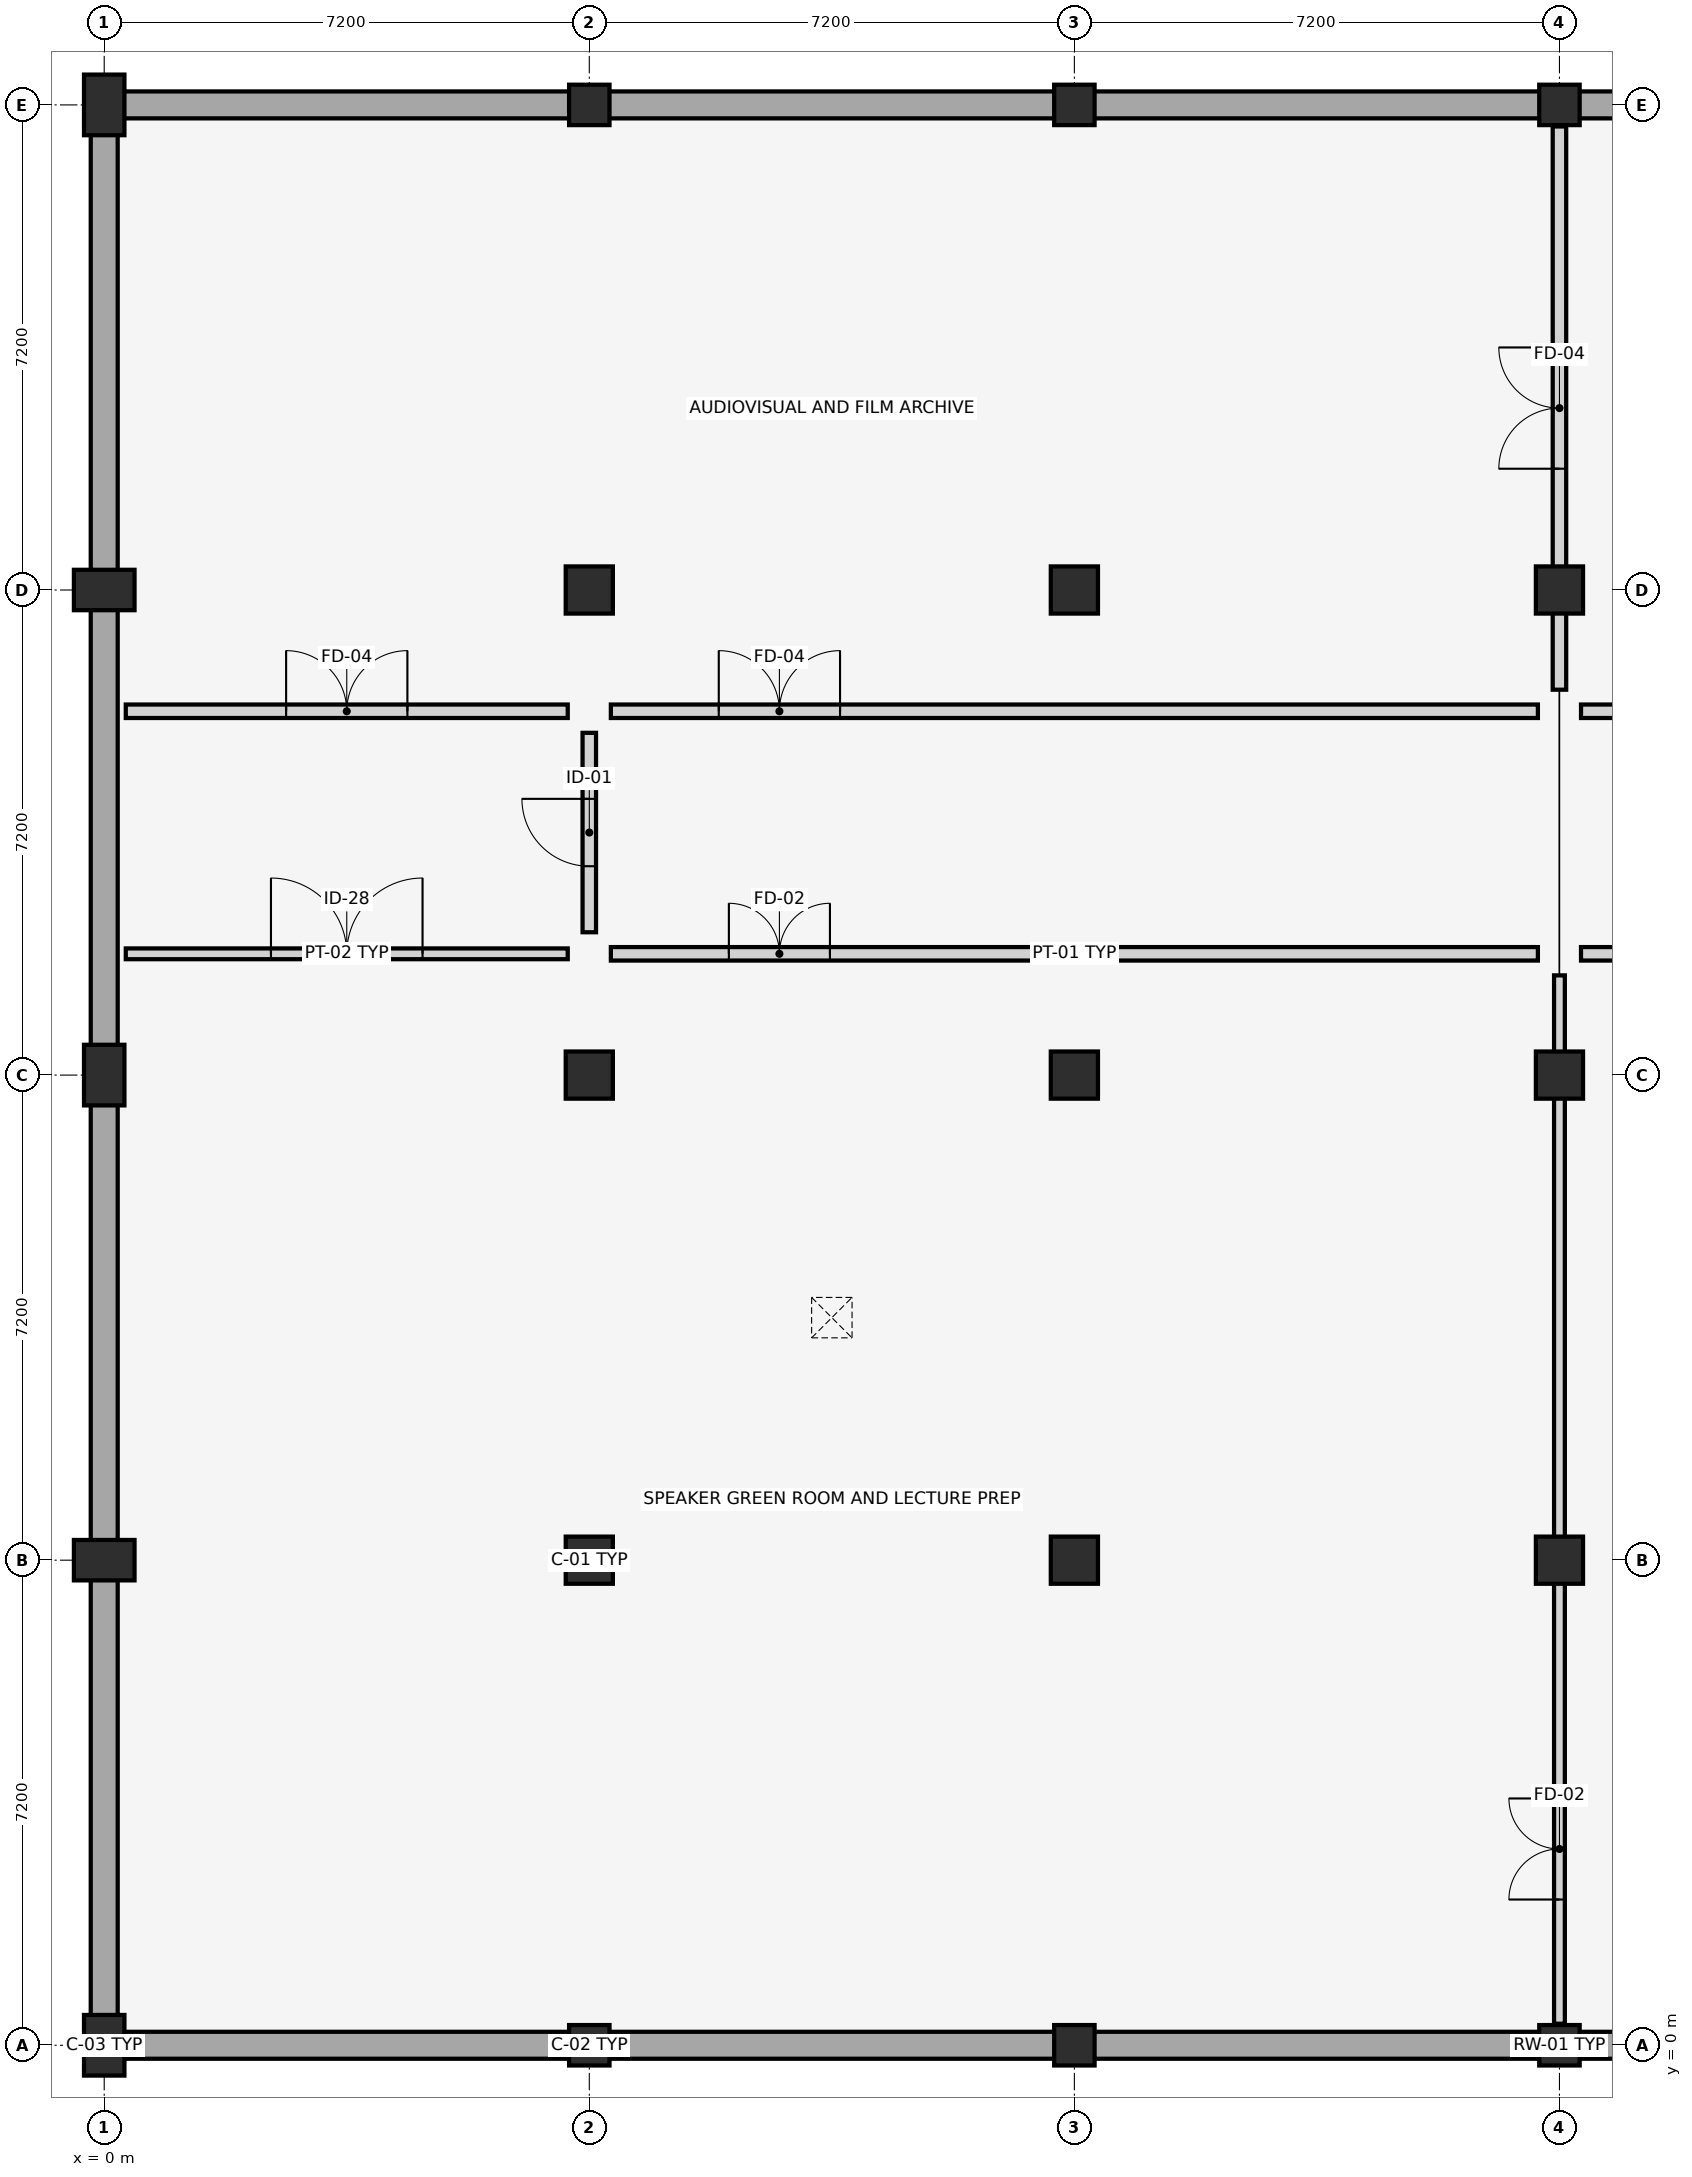
"""IFC4 building model, lengths in metres.
Left out: names, types, materials, properties, quantities, classifications, styles, units other than length and angle.
Written with IfcOpenShell. Run it as: python <this file> out.ifc"""

import sys

from ifc_helpers import new_model, si_unit, direction, frame, frame_2d, origin, origin_2d, place, context, subcontext, project, spatial, rectangle, extrude, element, fill, save


model = new_model("IFC4")
c1 = context("Model", 3, precision=1e-05, world=origin(), true_north=direction((0.0, 1.0)))
c2 = subcontext(c1, "Body", "Model", "MODEL_VIEW")
j1 = project(units=[si_unit("LENGTHUNIT", "METRE"), si_unit("PLANEANGLEUNIT", "RADIAN")], contexts=[c1])
p1 = place(None, origin())
s1 = spatial("IfcSite", under=j1, at=p1, CompositionType="ELEMENT")
p2 = place(p1, origin())
s2 = spatial("IfcBuilding", under=s1, at=p2, CompositionType="ELEMENT")
p3 = place(p2, frame((0.0, 0.0, -4.5)))
s3 = spatial("IfcBuildingStorey", under=s2, at=p3, CompositionType="ELEMENT", Elevation=-4.5)
for number, where, z_axis, x_axis in (
    (1, (-0.2, 0.0, 0.0), (0.0, 0.0, 1.0), (1.0, 0.0, 0.0)),
    (2, (43.4, 28.8, 0.0), (0.0, 0.0, 1.0), (-1.0, 0.0, 0.0)),
):
    element("IfcWall", number, at=place(p3, frame(where, z_axis=z_axis, x_axis=x_axis)), inside=s3, PredefinedType="USERDEFINED", context=c2, shape_type="SweptSolid", body=[
        extrude(rectangle(XDim=43.6, YDim=0.4, at=frame_2d((21.8, 0.0))), origin(), (0.0, 0.0, 1.0), 3.67),
    ])
p4 = place(p3, frame((0.0, 28.6, 0.0), z_axis=(0.0, 0.0, 1.0), x_axis=(0.0, -1.0, 0.0)))
e3 = element("IfcWall", 3, at=p4, inside=s3, PredefinedType="USERDEFINED", context=c2, shape_type="SweptSolid", body=[
    extrude(rectangle(XDim=28.4, YDim=0.4, at=frame_2d((14.2, 0.0))), origin(), (0.0, 0.0, 1.0), 3.67),
])
for number, where, z_axis, x_axis in (
    (4, (0.0, 0.0, -0.45), (0.0, 0.0, 1.0), (1.0, 0.0, 0.0)),
    (5, (0.0, 7.2, -0.45), (0.0, 0.0, 1.0), (0.0, 1.0, 0.0)),
    (6, (0.0, 14.4, -0.45), (0.0, 0.0, 1.0), (1.0, 0.0, 0.0)),
    (7, (0.0, 21.6, -0.45), (0.0, 0.0, 1.0), (0.0, 1.0, 0.0)),
    (8, (0.0, 28.8, -0.45), (0.0, 0.0, 1.0), (1.0, 0.0, 0.0)),
):
    element("IfcColumn", number, at=place(p3, frame(where, z_axis=z_axis, x_axis=x_axis)), inside=s3, PredefinedType="PILASTER", context=c2, shape_type="SweptSolid", body=[
        extrude(rectangle(XDim=0.6, YDim=0.9, at=origin_2d()), origin(), (0.0, 0.0, 1.0), 4.95),
    ])
p5 = place(p3, frame((7.2, 0.0, -0.45), z_axis=(0.0, 0.0, 1.0), x_axis=(0.0, 1.0, 0.0)))
e9 = element("IfcColumn", 9, at=p5, inside=s3, PredefinedType="COLUMN", context=c2, shape_type="SweptSolid", body=[
    extrude(rectangle(XDim=0.6, YDim=0.6, at=origin_2d()), origin(), (0.0, 0.0, 1.0), 4.95),
])
for number, where, z_axis, x_axis in (
    (10, (7.2, 7.2, -0.45), (0.0, 0.0, 1.0), (1.0, 0.0, 0.0)),
    (11, (7.2, 14.4, -0.45), (0.0, 0.0, 1.0), (0.0, 1.0, 0.0)),
    (12, (7.2, 21.6, -0.45), (0.0, 0.0, 1.0), (1.0, 0.0, 0.0)),
):
    element("IfcColumn", number, at=place(p3, frame(where, z_axis=z_axis, x_axis=x_axis)), inside=s3, PredefinedType="COLUMN", context=c2, shape_type="SweptSolid", body=[
        extrude(rectangle(XDim=0.7, YDim=0.7, at=origin_2d()), origin(), (0.0, 0.0, 1.0), 4.95),
    ])
for number, where, z_axis, x_axis in (
    (13, (7.2, 28.8, -0.45), (0.0, 0.0, 1.0), (0.0, 1.0, 0.0)),
    (14, (14.4, 0.0, -0.45), (0.0, 0.0, 1.0), (1.0, 0.0, 0.0)),
):
    element("IfcColumn", number, at=place(p3, frame(where, z_axis=z_axis, x_axis=x_axis)), inside=s3, PredefinedType="COLUMN", context=c2, shape_type="SweptSolid", body=[
        extrude(rectangle(XDim=0.6, YDim=0.6, at=origin_2d()), origin(), (0.0, 0.0, 1.0), 4.95),
    ])
for number, where, z_axis, x_axis in (
    (15, (14.4, 7.2, -0.45), (0.0, 0.0, 1.0), (0.0, 1.0, 0.0)),
    (16, (14.4, 14.4, -0.45), (0.0, 0.0, 1.0), (1.0, 0.0, 0.0)),
    (17, (14.4, 21.6, -0.45), (0.0, 0.0, 1.0), (0.0, 1.0, 0.0)),
):
    element("IfcColumn", number, at=place(p3, frame(where, z_axis=z_axis, x_axis=x_axis)), inside=s3, PredefinedType="COLUMN", context=c2, shape_type="SweptSolid", body=[
        extrude(rectangle(XDim=0.7, YDim=0.7, at=origin_2d()), origin(), (0.0, 0.0, 1.0), 4.95),
    ])
for number, where, z_axis, x_axis in (
    (18, (14.4, 28.8, -0.45), (0.0, 0.0, 1.0), (1.0, 0.0, 0.0)),
    (19, (21.6, 0.0, -0.45), (0.0, 0.0, 1.0), (0.0, 1.0, 0.0)),
):
    element("IfcColumn", number, at=place(p3, frame(where, z_axis=z_axis, x_axis=x_axis)), inside=s3, PredefinedType="COLUMN", context=c2, shape_type="SweptSolid", body=[
        extrude(rectangle(XDim=0.6, YDim=0.6, at=origin_2d()), origin(), (0.0, 0.0, 1.0), 4.95),
    ])
for number, where, z_axis, x_axis in (
    (20, (21.6, 7.2, -0.45), (0.0, 0.0, 1.0), (1.0, 0.0, 0.0)),
    (21, (21.6, 14.4, -0.45), (0.0, 0.0, 1.0), (0.0, 1.0, 0.0)),
    (22, (21.6, 21.6, -0.45), (0.0, 0.0, 1.0), (1.0, 0.0, 0.0)),
):
    element("IfcColumn", number, at=place(p3, frame(where, z_axis=z_axis, x_axis=x_axis)), inside=s3, PredefinedType="COLUMN", context=c2, shape_type="SweptSolid", body=[
        extrude(rectangle(XDim=0.7, YDim=0.7, at=origin_2d()), origin(), (0.0, 0.0, 1.0), 4.95),
    ])
p6 = place(p3, frame((21.6, 28.8, -0.45), z_axis=(0.0, 0.0, 1.0), x_axis=(0.0, 1.0, 0.0)))
e23 = element("IfcColumn", 23, at=p6, inside=s3, PredefinedType="COLUMN", context=c2, shape_type="SweptSolid", body=[
    extrude(rectangle(XDim=0.6, YDim=0.6, at=origin_2d()), origin(), (0.0, 0.0, 1.0), 4.95),
])
p7 = place(p3, frame((7.52, 16.2, 0.0), z_axis=(0.0, 0.0, 1.0), x_axis=(1.0, 0.0, 0.0)))
e24 = element("IfcWall", 24, at=p7, inside=s3, PredefinedType="PARTITIONING", context=c2, shape_type="SweptSolid", body=[
    extrude(rectangle(XDim=13.76, YDim=0.2, at=frame_2d((6.88, 0.0))), origin(), (0.0, 0.0, 1.0), 3.45),
])
p8 = place(p7, frame((1.752, 0.0, 0.0)))
e25 = element("IfcOpeningElement", 25, at=p8, cuts=e24, PredefinedType="OPENING", context=c2, shape_type="SweptSolid", body=[
    extrude(rectangle(XDim=1.5, YDim=2.25, at=frame_2d((0.75, 1.125))), frame((0.0, 0.11, 0.0), z_axis=(0.0, -1.0, 0.0), x_axis=(1.0, 0.0, 0.0)), (0.0, 0.0, 1.0), 0.22),
])
p9 = place(p3, frame((7.52, 19.8, 0.0), z_axis=(0.0, 0.0, 1.0), x_axis=(1.0, 0.0, 0.0)))
e26 = element("IfcWall", 26, at=p9, inside=s3, PredefinedType="PARTITIONING", context=c2, shape_type="SweptSolid", body=[
    extrude(rectangle(XDim=13.76, YDim=0.2, at=frame_2d((6.88, 0.0))), origin(), (0.0, 0.0, 1.0), 3.45),
])
p10 = place(p9, frame((1.602, 0.0, 0.0)))
e27 = element("IfcOpeningElement", 27, at=p10, cuts=e26, PredefinedType="OPENING", context=c2, shape_type="SweptSolid", body=[
    extrude(rectangle(XDim=1.8, YDim=2.4, at=frame_2d((0.9, 1.2))), frame((0.0, 0.11, 0.0), z_axis=(0.0, -1.0, 0.0), x_axis=(1.0, 0.0, 0.0)), (0.0, 0.0, 1.0), 0.22),
])
p11 = place(p3, frame((7.2, 16.52, 0.0), z_axis=(0.0, 0.0, 1.0), x_axis=(0.0, 1.0, 0.0)))
e28 = element("IfcWall", 28, at=p11, inside=s3, PredefinedType="PARTITIONING", context=c2, shape_type="SweptSolid", body=[
    extrude(rectangle(XDim=2.96, YDim=0.2, at=frame_2d((1.48, 0.0))), origin(), (0.0, 0.0, 1.0), 3.45),
])
p12 = place(p11, frame((0.98, 0.0, 0.0)))
e29 = element("IfcOpeningElement", 29, at=p12, cuts=e28, PredefinedType="OPENING", context=c2, shape_type="SweptSolid", body=[
    extrude(rectangle(XDim=1.0, YDim=2.15, at=frame_2d((0.5, 1.075))), frame((0.0, 0.11, 0.0), z_axis=(0.0, -1.0, 0.0), x_axis=(1.0, 0.0, 0.0)), (0.0, 0.0, 1.0), 0.22),
])
p13 = place(p3, frame((21.92, 16.2, 0.0), z_axis=(0.0, 0.0, 1.0), x_axis=(1.0, 0.0, 0.0)))
e30 = element("IfcWall", 30, at=p13, inside=s3, PredefinedType="PARTITIONING", context=c2, shape_type="SweptSolid", body=[
    extrude(rectangle(XDim=13.76, YDim=0.2, at=frame_2d((6.88, 0.0))), origin(), (0.0, 0.0, 1.0), 3.45),
])
p14 = place(p13, frame((1.752, 0.0, 0.0)))
e31 = element("IfcOpeningElement", 31, at=p14, cuts=e30, PredefinedType="OPENING", context=c2, shape_type="SweptSolid", body=[
    extrude(rectangle(XDim=1.5, YDim=2.25, at=frame_2d((0.75, 1.125))), frame((0.0, 0.11, 0.0), z_axis=(0.0, -1.0, 0.0), x_axis=(1.0, 0.0, 0.0)), (0.0, 0.0, 1.0), 0.22),
])
p15 = place(p3, frame((21.92, 19.8, 0.0), z_axis=(0.0, 0.0, 1.0), x_axis=(1.0, 0.0, 0.0)))
e32 = element("IfcWall", 32, at=p15, inside=s3, PredefinedType="PARTITIONING", context=c2, shape_type="SweptSolid", body=[
    extrude(rectangle(XDim=13.76, YDim=0.2, at=frame_2d((6.88, 0.0))), origin(), (0.0, 0.0, 1.0), 3.45),
])
p16 = place(p15, frame((1.702, 0.0, 0.0)))
e33 = element("IfcOpeningElement", 33, at=p16, cuts=e32, PredefinedType="OPENING", context=c2, shape_type="SweptSolid", body=[
    extrude(rectangle(XDim=1.6, YDim=2.35, at=frame_2d((0.8, 1.175))), frame((0.0, 0.11, 0.0), z_axis=(0.0, -1.0, 0.0), x_axis=(1.0, 0.0, 0.0)), (0.0, 0.0, 1.0), 0.22),
])
p17 = place(p3, frame((0.32, 16.2, 0.0), z_axis=(0.0, 0.0, 1.0), x_axis=(1.0, 0.0, 0.0)))
e34 = element("IfcWall", 34, at=p17, inside=s3, PredefinedType="PARTITIONING", context=c2, shape_type="SweptSolid", body=[
    extrude(rectangle(XDim=6.56, YDim=0.16, at=frame_2d((3.28, 0.0))), origin(), (0.0, 0.0, 1.0), 3.45),
])
p18 = place(p17, frame((2.155, 0.0, 0.0)))
e35 = element("IfcOpeningElement", 35, at=p18, cuts=e34, PredefinedType="OPENING", context=c2, shape_type="SweptSolid", body=[
    extrude(rectangle(XDim=2.25, YDim=2.7, at=frame_2d((1.125, 1.35))), frame((0.0, 0.09, 0.0), z_axis=(0.0, -1.0, 0.0), x_axis=(1.0, 0.0, 0.0)), (0.0, 0.0, 1.0), 0.18),
])
p19 = place(p3, frame((21.6, 0.32, 0.0), z_axis=(0.0, 0.0, 1.0), x_axis=(0.0, 1.0, 0.0)))
e36 = element("IfcWall", 36, at=p19, inside=s3, PredefinedType="PARTITIONING", context=c2, shape_type="SweptSolid", body=[
    extrude(rectangle(XDim=15.56, YDim=0.16, at=frame_2d((7.78, 0.0))), origin(), (0.0, 0.0, 1.0), 3.45),
])
p20 = place(p19, frame((1.843, 0.0, 0.0)))
e37 = element("IfcOpeningElement", 37, at=p20, cuts=e36, PredefinedType="OPENING", context=c2, shape_type="SweptSolid", body=[
    extrude(rectangle(XDim=1.5, YDim=2.25, at=frame_2d((0.75, 1.125))), frame((0.0, 0.09, 0.0), z_axis=(0.0, -1.0, 0.0), x_axis=(1.0, 0.0, 0.0)), (0.0, 0.0, 1.0), 0.18),
])
p21 = place(p3, frame((0.32, 19.8, 0.0), z_axis=(0.0, 0.0, 1.0), x_axis=(1.0, 0.0, 0.0)))
e38 = element("IfcWall", 38, at=p21, inside=s3, PredefinedType="PARTITIONING", context=c2, shape_type="SweptSolid", body=[
    extrude(rectangle(XDim=6.56, YDim=0.2, at=frame_2d((3.28, 0.0))), origin(), (0.0, 0.0, 1.0), 3.45),
])
p22 = place(p21, frame((2.38, 0.0, 0.0)))
e39 = element("IfcOpeningElement", 39, at=p22, cuts=e38, PredefinedType="OPENING", context=c2, shape_type="SweptSolid", body=[
    extrude(rectangle(XDim=1.8, YDim=2.4, at=frame_2d((0.9, 1.2))), frame((0.0, 0.11, 0.0), z_axis=(0.0, -1.0, 0.0), x_axis=(1.0, 0.0, 0.0)), (0.0, 0.0, 1.0), 0.22),
])
p23 = place(p3, frame((21.6, 20.12, 0.0), z_axis=(0.0, 0.0, 1.0), x_axis=(0.0, 1.0, 0.0)))
e40 = element("IfcWall", 40, at=p23, inside=s3, PredefinedType="PARTITIONING", context=c2, shape_type="SweptSolid", body=[
    extrude(rectangle(XDim=8.36, YDim=0.2, at=frame_2d((4.18, 0.0))), origin(), (0.0, 0.0, 1.0), 3.45),
])
p24 = place(p23, frame((3.28, 0.0, 0.0)))
e41 = element("IfcOpeningElement", 41, at=p24, cuts=e40, PredefinedType="OPENING", context=c2, shape_type="SweptSolid", body=[
    extrude(rectangle(XDim=1.8, YDim=2.4, at=frame_2d((0.9, 1.2))), frame((0.0, 0.11, 0.0), z_axis=(0.0, -1.0, 0.0), x_axis=(1.0, 0.0, 0.0)), (0.0, 0.0, 1.0), 0.22),
])
p25 = place(p8, origin())
e42 = element("IfcDoor", 42, at=p25, inside=s3, OperationType="DOUBLE_DOOR_SINGLE_SWING", PredefinedType="DOOR", context=c2, shape_type="SweptSolid", body=[
    extrude(rectangle(XDim=1.5, YDim=2.25, at=frame_2d((0.75, 1.125))), frame((0.0, 0.025, 0.0), z_axis=(0.0, -1.0, 0.0), x_axis=(1.0, 0.0, 0.0)), (0.0, 0.0, 1.0), 0.05),
])
fill(e25, e42)
p26 = place(p10, origin())
e43 = element("IfcDoor", 43, at=p26, inside=s3, OperationType="DOUBLE_DOOR_SINGLE_SWING", PredefinedType="DOOR", context=c2, shape_type="SweptSolid", body=[
    extrude(rectangle(XDim=1.8, YDim=2.4, at=frame_2d((0.9, 1.2))), frame((0.0, 0.025, 0.0), z_axis=(0.0, -1.0, 0.0), x_axis=(1.0, 0.0, 0.0)), (0.0, 0.0, 1.0), 0.05),
])
fill(e27, e43)
p27 = place(p12, origin())
e44 = element("IfcDoor", 44, at=p27, inside=s3, OperationType="SINGLE_SWING_RIGHT", PredefinedType="DOOR", context=c2, shape_type="SweptSolid", body=[
    extrude(rectangle(XDim=1.0, YDim=2.15, at=frame_2d((0.5, 1.075))), frame((0.0, 0.025, 0.0), z_axis=(0.0, -1.0, 0.0), x_axis=(1.0, 0.0, 0.0)), (0.0, 0.0, 1.0), 0.05),
])
fill(e29, e44)
p28 = place(p18, origin())
e45 = element("IfcDoor", 45, at=p28, inside=s3, OperationType="DOUBLE_DOOR_SINGLE_SWING", PredefinedType="DOOR", context=c2, shape_type="SweptSolid", body=[
    extrude(rectangle(XDim=2.25, YDim=2.7, at=frame_2d((1.125, 1.35))), frame((0.0, 0.025, 0.0), z_axis=(0.0, -1.0, 0.0), x_axis=(1.0, 0.0, 0.0)), (0.0, 0.0, 1.0), 0.05),
])
fill(e35, e45)
p29 = place(p20, origin())
e46 = element("IfcDoor", 46, at=p29, inside=s3, OperationType="DOUBLE_DOOR_SINGLE_SWING", PredefinedType="DOOR", context=c2, shape_type="SweptSolid", body=[
    extrude(rectangle(XDim=1.5, YDim=2.25, at=frame_2d((0.75, 1.125))), frame((0.0, 0.025, 0.0), z_axis=(0.0, -1.0, 0.0), x_axis=(1.0, 0.0, 0.0)), (0.0, 0.0, 1.0), 0.05),
])
fill(e37, e46)
p30 = place(p22, origin())
e47 = element("IfcDoor", 47, at=p30, inside=s3, OperationType="DOUBLE_DOOR_SINGLE_SWING", PredefinedType="DOOR", context=c2, shape_type="SweptSolid", body=[
    extrude(rectangle(XDim=1.8, YDim=2.4, at=frame_2d((0.9, 1.2))), frame((0.0, 0.025, 0.0), z_axis=(0.0, -1.0, 0.0), x_axis=(1.0, 0.0, 0.0)), (0.0, 0.0, 1.0), 0.05),
])
fill(e39, e47)
p31 = place(p24, origin())
e48 = element("IfcDoor", 48, at=p31, inside=s3, OperationType="DOUBLE_DOOR_SINGLE_SWING", PredefinedType="DOOR", context=c2, shape_type="SweptSolid", body=[
    extrude(rectangle(XDim=1.8, YDim=2.4, at=frame_2d((0.9, 1.2))), frame((0.0, 0.025, 0.0), z_axis=(0.0, -1.0, 0.0), x_axis=(1.0, 0.0, 0.0)), (0.0, 0.0, 1.0), 0.05),
])
fill(e41, e48)
save(model, sys.argv[1])
